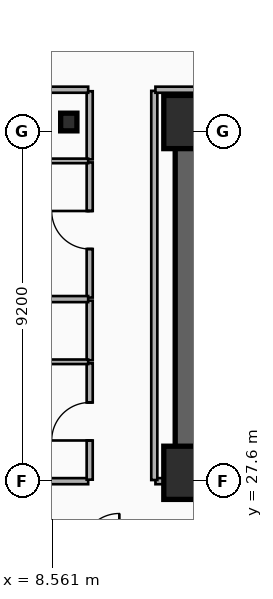
"""IFC4 building model, lengths in metres.
Left out: names, types, materials, properties, quantities, classifications, styles, units other than length and angle.
Written with IfcOpenShell. Run it as: python <this file> out.ifc"""

import sys

from ifc_helpers import new_model, si_unit, direction, frame, frame_2d, origin, origin_2d, place, context, subcontext, project, spatial, rectangle, i_section, extrude, element, fill, save


model = new_model("IFC4")
c1 = context("Model", 3, precision=1e-05, world=origin(), true_north=direction((0.0, 1.0)))
c2 = subcontext(c1, "Body", "Model", "MODEL_VIEW")
j1 = project(units=[si_unit("LENGTHUNIT", "METRE"), si_unit("PLANEANGLEUNIT", "RADIAN")], contexts=[c1])
p1 = place(None, origin())
s1 = spatial("IfcSite", under=j1, at=p1, CompositionType="ELEMENT")
p2 = place(p1, origin())
s2 = spatial("IfcBuilding", under=s1, at=p2, CompositionType="ELEMENT")
p3 = place(p2, frame((0.0, 0.0, 39.5)))
s3 = spatial("IfcBuildingStorey", under=s2, at=p3, CompositionType="ELEMENT", Elevation=39.5)
p4 = place(p3, frame((12.15, 37.05, 0.0), z_axis=(0.0, 0.0, 1.0), x_axis=(1.0, 0.0, 0.0)))
e1 = element("IfcWall", 1, at=p4, inside=s3, PredefinedType="SHEAR", context=c2, shape_type="SweptSolid", body=[
    extrude(rectangle(XDim=33.23, YDim=0.7, at=frame_2d((16.615, 0.0))), origin(), (0.0, 0.0, 1.0), 3.5),
])
p5 = place(p3, frame((21.18, 27.82, 0.0), z_axis=(0.0, 0.0, 1.0), x_axis=(-1.0, 0.0, 0.0)))
e2 = element("IfcWall", 2, at=p5, inside=s3, PredefinedType="SHEAR", context=c2, shape_type="SweptSolid", body=[
    extrude(rectangle(XDim=9.03, YDim=0.7, at=frame_2d((4.515, 0.0))), origin(), (0.0, 0.0, 1.0), 3.5),
])
p6 = place(p5, frame((2.68, 0.0, 0.0)))
e3 = element("IfcOpeningElement", 3, at=p6, cuts=e2, PredefinedType="OPENING", context=c2, shape_type="SweptSolid", body=[
    extrude(rectangle(XDim=1.1, YDim=2.15, at=frame_2d((0.55, 1.075))), frame((0.0, 0.36, 0.0), z_axis=(0.0, -1.0, 0.0), x_axis=(1.0, 0.0, 0.0)), (0.0, 0.0, 1.0), 0.72),
])
p7 = place(p3, frame((12.15, 28.17, 0.0), z_axis=(0.0, 0.0, 1.0), x_axis=(0.0, 1.0, 0.0)))
e4 = element("IfcWall", 4, at=p7, inside=s3, PredefinedType="SHEAR", context=c2, shape_type="SweptSolid", body=[
    extrude(rectangle(XDim=8.53, YDim=0.7, at=frame_2d((4.265, 0.0))), origin(), (0.0, 0.0, 1.0), 3.5),
])
for number, where, z_axis, x_axis in (
    (5, (12.2, 27.82, 0.0), (0.0, 0.0, 1.0), (1.0, 0.0, 0.0)),
    (6, (12.2, 37.05, 0.0), (0.0, 0.0, 1.0), (1.0, 0.0, 0.0)),
):
    element("IfcColumn", number, at=place(p3, frame(where, z_axis=z_axis, x_axis=x_axis)), inside=s3, PredefinedType="COLUMN", context=c2, shape_type="SweptSolid", body=[
        extrude(rectangle(XDim=1.4, YDim=1.4, at=origin_2d()), origin(), (0.0, 0.0, 1.0), 3.5),
    ])
p8 = place(p3, frame((9.0, 37.05, 0.0), z_axis=(0.0, 0.0, 1.0), x_axis=(1.0, 0.0, 0.0)))
e7 = element("IfcColumn", 7, at=p8, inside=s3, PredefinedType="COLUMN", context=c2, shape_type="SweptSolid", body=[
    extrude(i_section(OverallWidth=0.428, OverallDepth=0.465, WebThickness=0.045, FlangeThickness=0.073, FilletRadius=0.015, at=origin_2d()), origin(), (0.0, 0.0, 1.0), 3.5),
])
p9 = place(p3, frame((0.26, 27.6, 0.0), z_axis=(0.0, 0.0, 1.0), x_axis=(1.0, 0.0, 0.0)))
e8 = element("IfcWall", 8, at=p9, inside=s3, PredefinedType="PARTITIONING", context=c2, shape_type="SweptSolid", body=[
    extrude(rectangle(XDim=9.25, YDim=0.16, at=frame_2d((4.625, 0.0))), origin(), (0.0, 0.0, 1.0), 2.57),
])
p10 = place(p9, frame((4.125, 0.0, 0.0)))
e9 = element("IfcOpeningElement", 9, at=p10, cuts=e8, PredefinedType="OPENING", context=c2, shape_type="SweptSolid", body=[
    extrude(rectangle(XDim=1.0, YDim=2.15, at=frame_2d((0.5, 1.075))), frame((0.0, 0.09, 0.0), z_axis=(0.0, -1.0, 0.0), x_axis=(1.0, 0.0, 0.0)), (0.0, 0.0, 1.0), 0.18),
])
p11 = place(p3, frame((9.55, 27.64, 0.0), z_axis=(0.0, 0.0, 1.0), x_axis=(0.0, 1.0, 0.0)))
e10 = element("IfcWall", 10, at=p11, inside=s3, PredefinedType="PARTITIONING", context=c2, shape_type="SweptSolid", body=[
    extrude(rectangle(XDim=3.061, YDim=0.16, at=frame_2d((1.531, 0.0))), origin(), (0.0, 0.0, 1.0), 3.24),
])
p12 = place(p11, frame((1.031, 0.0, 0.0)))
e11 = element("IfcOpeningElement", 11, at=p12, cuts=e10, PredefinedType="OPENING", context=c2, shape_type="SweptSolid", body=[
    extrude(rectangle(XDim=1.0, YDim=2.15, at=frame_2d((0.5, 1.075))), frame((0.0, 0.09, 0.0), z_axis=(0.0, -1.0, 0.0), x_axis=(1.0, 0.0, 0.0)), (0.0, 0.0, 1.0), 0.18),
])
p13 = place(p3, frame((9.55, 30.781, 0.0), z_axis=(0.0, 0.0, 1.0), x_axis=(0.0, 1.0, 0.0)))
e12 = element("IfcWall", 12, at=p13, inside=s3, PredefinedType="PARTITIONING", context=c2, shape_type="SweptSolid", body=[
    extrude(rectangle(XDim=1.57, YDim=0.16, at=frame_2d((0.785, 0.0))), origin(), (0.0, 0.0, 1.0), 3.24),
])
p14 = place(p3, frame((9.55, 32.431, 0.0), z_axis=(0.0, 0.0, 1.0), x_axis=(0.0, 1.0, 0.0)))
e13 = element("IfcWall", 13, at=p14, inside=s3, PredefinedType="PARTITIONING", context=c2, shape_type="SweptSolid", body=[
    extrude(rectangle(XDim=3.556, YDim=0.16, at=frame_2d((1.778, 0.0))), origin(), (0.0, 0.0, 1.0), 3.24),
])
p15 = place(p14, frame((1.278, 0.0, 0.0)))
e14 = element("IfcOpeningElement", 14, at=p15, cuts=e13, PredefinedType="OPENING", context=c2, shape_type="SweptSolid", body=[
    extrude(rectangle(XDim=1.0, YDim=2.15, at=frame_2d((0.5, 1.075))), frame((0.0, 0.09, 0.0), z_axis=(0.0, -1.0, 0.0), x_axis=(1.0, 0.0, 0.0)), (0.0, 0.0, 1.0), 0.18),
])
p16 = place(p3, frame((9.55, 36.067, 0.0), z_axis=(0.0, 0.0, 1.0), x_axis=(0.0, 1.0, 0.0)))
e15 = element("IfcWall", 15, at=p16, inside=s3, PredefinedType="PARTITIONING", context=c2, shape_type="SweptSolid", body=[
    extrude(rectangle(XDim=1.793, YDim=0.16, at=frame_2d((0.896, 0.0))), origin(), (0.0, 0.0, 1.0), 2.72),
])
p17 = place(p3, frame((2.8, 37.9, 0.0), z_axis=(0.0, 0.0, 1.0), x_axis=(1.0, 0.0, 0.0)))
e16 = element("IfcWall", 16, at=p17, inside=s3, PredefinedType="PARTITIONING", context=c2, shape_type="SweptSolid", body=[
    extrude(rectangle(XDim=6.71, YDim=0.16, at=frame_2d((3.355, 0.0))), origin(), (0.0, 0.0, 1.0), 3.24),
])
p18 = place(p3, frame((2.8, 30.741, 0.0), z_axis=(0.0, 0.0, 1.0), x_axis=(1.0, 0.0, 0.0)))
e17 = element("IfcWall", 17, at=p18, inside=s3, PredefinedType="PARTITIONING", context=c2, shape_type="SweptSolid", body=[
    extrude(rectangle(XDim=6.71, YDim=0.12, at=frame_2d((3.355, 0.0))), origin(), (0.0, 0.0, 1.0), 2.57),
])
p19 = place(p18, frame((2.905, 0.0, 0.0)))
e18 = element("IfcOpeningElement", 18, at=p19, cuts=e17, PredefinedType="OPENING", context=c2, shape_type="SweptSolid", body=[
    extrude(rectangle(XDim=0.9, YDim=2.1, at=frame_2d((0.45, 1.05))), frame((0.0, 0.07, 0.0), z_axis=(0.0, -1.0, 0.0), x_axis=(1.0, 0.0, 0.0)), (0.0, 0.0, 1.0), 0.14),
])
p20 = place(p3, frame((2.8, 32.391, 0.0), z_axis=(0.0, 0.0, 1.0), x_axis=(1.0, 0.0, 0.0)))
e19 = element("IfcWall", 19, at=p20, inside=s3, PredefinedType="PARTITIONING", context=c2, shape_type="SweptSolid", body=[
    extrude(rectangle(XDim=6.71, YDim=0.16, at=frame_2d((3.355, 0.0))), origin(), (0.0, 0.0, 1.0), 2.57),
])
p21 = place(p3, frame((2.8, 36.027, 0.0), z_axis=(0.0, 0.0, 1.0), x_axis=(1.0, 0.0, 0.0)))
e20 = element("IfcWall", 20, at=p21, inside=s3, PredefinedType="PARTITIONING", context=c2, shape_type="SweptSolid", body=[
    extrude(rectangle(XDim=6.71, YDim=0.12, at=frame_2d((3.355, 0.0))), origin(), (0.0, 0.0, 1.0), 2.57),
])
p22 = place(p21, frame((2.905, 0.0, 0.0)))
e21 = element("IfcOpeningElement", 21, at=p22, cuts=e20, PredefinedType="OPENING", context=c2, shape_type="SweptSolid", body=[
    extrude(rectangle(XDim=0.9, YDim=2.1, at=frame_2d((0.45, 1.05))), frame((0.0, 0.07, 0.0), z_axis=(0.0, -1.0, 0.0), x_axis=(1.0, 0.0, 0.0)), (0.0, 0.0, 1.0), 0.14),
])
p23 = place(p3, frame((11.28, 27.6, 0.0), z_axis=(0.0, 0.0, 1.0), x_axis=(1.0, 0.0, 0.0)))
e22 = element("IfcWall", 22, at=p23, inside=s3, PredefinedType="PARTITIONING", context=c2, shape_type="SweptSolid", body=[
    extrude(rectangle(XDim=0.84, YDim=0.16, at=frame_2d((0.42, 0.0))), origin(), (0.0, 0.0, 1.0), 2.28),
])
p24 = place(p3, frame((11.25, 27.63, 0.0), z_axis=(0.0, 0.0, 1.0), x_axis=(0.0, 1.0, 0.0)))
e23 = element("IfcWall", 23, at=p24, inside=s3, PredefinedType="PARTITIONING", context=c2, shape_type="SweptSolid", body=[
    extrude(rectangle(XDim=10.24, YDim=0.16, at=frame_2d((5.12, 0.0))), origin(), (0.0, 0.0, 1.0), 2.72),
])
p25 = place(p3, frame((11.28, 37.9, 0.0), z_axis=(0.0, 0.0, 1.0), x_axis=(1.0, 0.0, 0.0)))
e24 = element("IfcWall", 24, at=p25, inside=s3, PredefinedType="PARTITIONING", context=c2, shape_type="SweptSolid", body=[
    extrude(rectangle(XDim=35.04, YDim=0.16, at=frame_2d((17.52, 0.0))), origin(), (0.0, 0.0, 1.0), 3.24),
])
p26 = place(p12, origin())
e25 = element("IfcDoor", 25, at=p26, inside=s3, OperationType="SINGLE_SWING_LEFT", PredefinedType="DOOR", context=c2, shape_type="SweptSolid", body=[
    extrude(rectangle(XDim=1.0, YDim=2.15, at=frame_2d((0.5, 1.075))), frame((0.0, 0.025, 0.0), z_axis=(0.0, -1.0, 0.0), x_axis=(1.0, 0.0, 0.0)), (0.0, 0.0, 1.0), 0.05),
])
fill(e11, e25)
p27 = place(p15, origin())
e26 = element("IfcDoor", 26, at=p27, inside=s3, OperationType="SINGLE_SWING_RIGHT", PredefinedType="DOOR", context=c2, shape_type="SweptSolid", body=[
    extrude(rectangle(XDim=1.0, YDim=2.15, at=frame_2d((0.5, 1.075))), frame((0.0, 0.025, 0.0), z_axis=(0.0, -1.0, 0.0), x_axis=(1.0, 0.0, 0.0)), (0.0, 0.0, 1.0), 0.05),
])
fill(e14, e26)
save(model, sys.argv[1])
